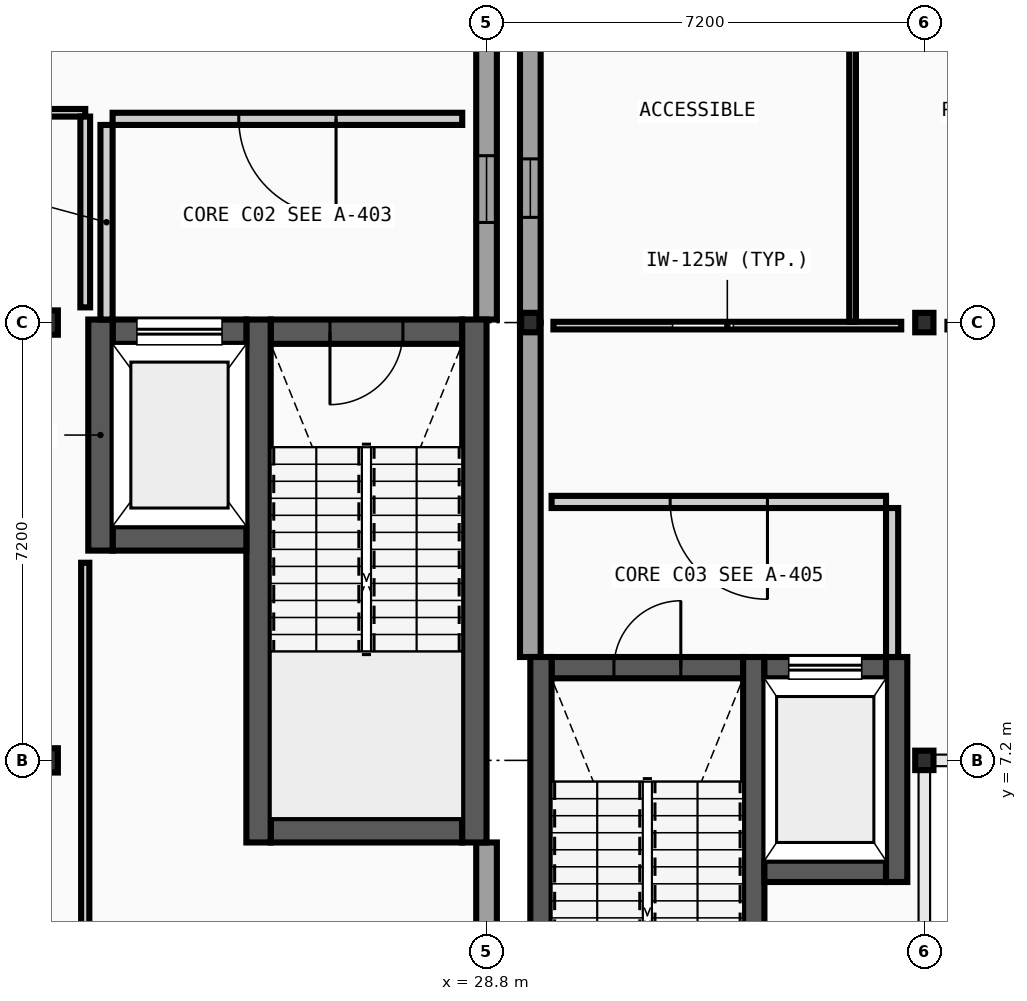
"""IFC4 building model, lengths in metres.
Left out: names, types, materials, properties, quantities, classifications, styles, units other than length and angle.
Written with IfcOpenShell. Run it as: python <this file> out.ifc"""

import sys

from ifc_helpers import new_model, si_unit, direction, frame, frame_2d, origin, origin_2d, place, context, subcontext, project, spatial, rectangle, i_section, extrude, element, fill, save


model = new_model("IFC4")
c1 = context("Model", 3, precision=1e-05, world=origin(), true_north=direction((0.0, 1.0)))
c2 = subcontext(c1, "Body", "Model", "MODEL_VIEW")
j1 = project(units=[si_unit("LENGTHUNIT", "METRE"), si_unit("PLANEANGLEUNIT", "RADIAN")], contexts=[c1])
p1 = place(None, origin())
s1 = spatial("IfcSite", under=j1, at=p1, CompositionType="ELEMENT")
p2 = place(p1, origin())
s2 = spatial("IfcBuilding", under=s1, at=p2, CompositionType="ELEMENT")
p3 = place(p2, frame((0.0, 0.0, 14.0)))
s3 = spatial("IfcBuildingStorey", under=s2, at=p3, CompositionType="ELEMENT", Elevation=14.0)
for number, where, z_axis, x_axis in (
    (1, (21.6, 7.2, 0.0), (0.0, 0.0, 1.0), (1.0, 0.0, 0.0)),
    (2, (21.6, 14.4, 0.0), (0.0, 0.0, 1.0), (1.0, 0.0, 0.0)),
):
    element("IfcColumn", number, at=place(p3, frame(where, z_axis=z_axis, x_axis=x_axis)), inside=s3, PredefinedType="COLUMN", context=c2, shape_type="SweptSolid", body=[
        extrude(i_section(OverallWidth=0.3, OverallDepth=0.4, WebThickness=0.013, FlangeThickness=0.024, FilletRadius=0.027, at=origin_2d()), origin(), (0.0, 0.0, 1.0), 4.4),
    ])
for number, where, z_axis, x_axis in (
    (3, (29.52, 14.4, 0.0), (0.0, 0.0, 1.0), (1.0, 0.0, 0.0)),
    (4, (36.0, 7.2, 0.0), (0.0, 0.0, 1.0), (1.0, 0.0, 0.0)),
    (5, (36.0, 14.4, 0.0), (0.0, 0.0, 1.0), (1.0, 0.0, 0.0)),
):
    element("IfcColumn", number, at=place(p3, frame(where, z_axis=z_axis, x_axis=x_axis)), inside=s3, PredefinedType="COLUMN", context=c2, shape_type="SweptSolid", body=[
        extrude(i_section(OverallWidth=0.3, OverallDepth=0.32, WebThickness=0.011, FlangeThickness=0.021, FilletRadius=0.027, at=origin_2d()), origin(), (0.0, 0.0, 1.0), 4.4),
    ])
p4 = place(p3, frame((28.8, -0.17, 0.0), z_axis=(0.0, 0.0, 1.0), x_axis=(0.0, 1.0, 0.0)))
e6 = element("IfcWall", 6, at=p4, inside=s3, PredefinedType="STANDARD", context=c2, shape_type="SweptSolid", body=[
    extrude(rectangle(XDim=6.02, YDim=0.34, at=frame_2d((3.01, 0.0))), origin(), (0.0, 0.0, 1.0), 4.2),
])
p5 = place(p4, frame((2.478, 0.0, 0.95)))
e7 = element("IfcOpeningElement", 7, at=p5, cuts=e6, PredefinedType="OPENING", context=c2, shape_type="SweptSolid", body=[
    extrude(rectangle(XDim=1.064, YDim=1.368, at=frame_2d((0.532, 0.684))), frame((0.0, 0.18, 0.0), z_axis=(0.0, -1.0, 0.0), x_axis=(1.0, 0.0, 0.0)), (0.0, 0.0, 1.0), 0.36),
])
p6 = place(p3, frame((28.8, 14.45, 0.0), z_axis=(0.0, 0.0, 1.0), x_axis=(0.0, 1.0, 0.0)))
e8 = element("IfcWall", 8, at=p6, inside=s3, PredefinedType="STANDARD", context=c2, shape_type="SweptSolid", body=[
    extrude(rectangle(XDim=7.15, YDim=0.34, at=frame_2d((3.575, 0.0))), origin(), (0.0, 0.0, 1.0), 4.2),
])
p7 = place(p6, frame((1.596, 0.0, 0.95)))
e9 = element("IfcOpeningElement", 9, at=p7, cuts=e8, PredefinedType="OPENING", context=c2, shape_type="SweptSolid", body=[
    extrude(rectangle(XDim=1.098, YDim=1.368, at=frame_2d((0.549, 0.684))), frame((0.0, 0.18, 0.0), z_axis=(0.0, -1.0, 0.0), x_axis=(1.0, 0.0, 0.0)), (0.0, 0.0, 1.0), 0.36),
])
p8 = place(p6, frame((4.456, 0.0, 0.95)))
e10 = element("IfcOpeningElement", 10, at=p8, cuts=e8, PredefinedType="OPENING", context=c2, shape_type="SweptSolid", body=[
    extrude(rectangle(XDim=1.098, YDim=1.368, at=frame_2d((0.549, 0.684))), frame((0.0, 0.18, 0.0), z_axis=(0.0, -1.0, 0.0), x_axis=(1.0, 0.0, 0.0)), (0.0, 0.0, 1.0), 0.36),
])
p9 = place(p3, frame((29.52, 14.4, 0.0), z_axis=(0.0, 0.0, 1.0), x_axis=(0.0, -1.0, 0.0)))
e11 = element("IfcWall", 11, at=p9, inside=s3, PredefinedType="STANDARD", context=c2, shape_type="SweptSolid", body=[
    extrude(rectangle(XDim=5.5, YDim=0.34, at=frame_2d((2.75, 0.0))), origin(), (0.0, 0.0, 1.0), 4.2),
])
p10 = place(p3, frame((29.52, 21.77, 0.0), z_axis=(0.0, 0.0, 1.0), x_axis=(0.0, -1.0, 0.0)))
e12 = element("IfcWall", 12, at=p10, inside=s3, PredefinedType="STANDARD", context=c2, shape_type="SweptSolid", body=[
    extrude(rectangle(XDim=7.37, YDim=0.34, at=frame_2d((3.685, 0.0))), origin(), (0.0, 0.0, 1.0), 3.895),
])
p11 = place(p10, frame((1.73, 0.0, 0.95)))
e13 = element("IfcOpeningElement", 13, at=p11, cuts=e12, PredefinedType="OPENING", context=c2, shape_type="SweptSolid", body=[
    extrude(rectangle(XDim=0.962, YDim=1.404, at=frame_2d((0.481, 0.702))), frame((0.0, 0.18, 0.0), z_axis=(0.0, -1.0, 0.0), x_axis=(1.0, 0.0, 0.0)), (0.0, 0.0, 1.0), 0.36),
])
p12 = place(p10, frame((4.678, 0.0, 0.95)))
e14 = element("IfcOpeningElement", 14, at=p12, cuts=e12, PredefinedType="OPENING", context=c2, shape_type="SweptSolid", body=[
    extrude(rectangle(XDim=0.962, YDim=1.404, at=frame_2d((0.481, 0.702))), frame((0.0, 0.18, 0.0), z_axis=(0.0, -1.0, 0.0), x_axis=(1.0, 0.0, 0.0)), (0.0, 0.0, 1.0), 0.36),
])
p13 = place(p3, frame((25.25, 6.05, 0.0), z_axis=(0.0, 0.0, 1.0), x_axis=(1.0, 0.0, 0.0)))
e15 = element("IfcWall", 15, at=p13, inside=s3, PredefinedType="SHEAR", context=c2, shape_type="SweptSolid", body=[
    extrude(rectangle(XDim=3.15, YDim=0.4, at=frame_2d((1.575, 0.0))), origin(), (0.0, 0.0, 1.0), 4.2),
])
p14 = place(p3, frame((25.25, 14.25, 0.0), z_axis=(0.0, 0.0, 1.0), x_axis=(1.0, 0.0, 0.0)))
e16 = element("IfcWall", 16, at=p14, inside=s3, PredefinedType="SHEAR", context=c2, shape_type="SweptSolid", body=[
    extrude(rectangle(XDim=3.15, YDim=0.4, at=frame_2d((1.575, 0.0))), origin(), (0.0, 0.0, 1.0), 4.2),
])
p15 = place(p14, frame((0.975, 0.0, 0.0)))
e17 = element("IfcOpeningElement", 17, at=p15, cuts=e16, PredefinedType="OPENING", context=c2, shape_type="SweptSolid", body=[
    extrude(rectangle(XDim=1.2, YDim=2.15, at=frame_2d((0.6, 1.075))), frame((0.0, 0.21, 0.0), z_axis=(0.0, -1.0, 0.0), x_axis=(1.0, 0.0, 0.0)), (0.0, 0.0, 1.0), 0.42),
])
for number, where, z_axis, x_axis in (
    (18, (25.05, 5.85, 0.0), (0.0, 0.0, 1.0), (0.0, 1.0, 0.0)),
    (19, (28.6, 5.85, 0.0), (0.0, 0.0, 1.0), (0.0, 1.0, 0.0)),
):
    element("IfcWall", number, at=place(p3, frame(where, z_axis=z_axis, x_axis=x_axis)), inside=s3, PredefinedType="SHEAR", context=c2, shape_type="SweptSolid", body=[
        extrude(rectangle(XDim=8.6, YDim=0.4, at=frame_2d((4.3, 0.0))), origin(), (0.0, 0.0, 1.0), 4.2),
    ])
p16 = place(p3, frame((22.65, 10.85, 0.0), z_axis=(0.0, 0.0, 1.0), x_axis=(1.0, 0.0, 0.0)))
e20 = element("IfcWall", 20, at=p16, inside=s3, PredefinedType="SHEAR", context=c2, shape_type="SweptSolid", body=[
    extrude(rectangle(XDim=2.2, YDim=0.4, at=frame_2d((1.1, 0.0))), origin(), (0.0, 0.0, 1.0), 4.2),
])
p17 = place(p3, frame((22.65, 14.25, 0.0), z_axis=(0.0, 0.0, 1.0), x_axis=(1.0, 0.0, 0.0)))
e21 = element("IfcWall", 21, at=p17, inside=s3, PredefinedType="SHEAR", context=c2, shape_type="SweptSolid", body=[
    extrude(rectangle(XDim=2.2, YDim=0.4, at=frame_2d((1.1, 0.0))), origin(), (0.0, 0.0, 1.0), 4.2),
])
p18 = place(p17, frame((0.4, 0.0, 0.0)))
e22 = element("IfcOpeningElement", 22, at=p18, cuts=e21, PredefinedType="OPENING", context=c2, shape_type="SweptSolid", body=[
    extrude(rectangle(XDim=1.4, YDim=2.2, at=frame_2d((0.7, 1.1))), frame((0.0, 0.21, 0.0), z_axis=(0.0, -1.0, 0.0), x_axis=(1.0, 0.0, 0.0)), (0.0, 0.0, 1.0), 0.42),
])
p19 = place(p3, frame((22.45, 10.65, 0.0), z_axis=(0.0, 0.0, 1.0), x_axis=(0.0, 1.0, 0.0)))
e23 = element("IfcWall", 23, at=p19, inside=s3, PredefinedType="SHEAR", context=c2, shape_type="SweptSolid", body=[
    extrude(rectangle(XDim=3.8, YDim=0.4, at=frame_2d((1.9, 0.0))), origin(), (0.0, 0.0, 1.0), 4.2),
])
p20 = place(p3, frame((22.65, 17.75, 0.0), z_axis=(0.0, 0.0, 1.0), x_axis=(1.0, 0.0, 0.0)))
e24 = element("IfcWall", 24, at=p20, inside=s3, PredefinedType="PARTITIONING", context=c2, shape_type="SweptSolid", body=[
    extrude(rectangle(XDim=5.75, YDim=0.2, at=frame_2d((2.875, 0.0))), origin(), (0.0, 0.0, 1.0), 4.2),
])
p21 = place(p20, frame((2.075, 0.0, 0.0)))
e25 = element("IfcOpeningElement", 25, at=p21, cuts=e24, PredefinedType="OPENING", context=c2, shape_type="SweptSolid", body=[
    extrude(rectangle(XDim=1.6, YDim=2.2, at=frame_2d((0.8, 1.1))), frame((0.0, 0.11, 0.0), z_axis=(0.0, -1.0, 0.0), x_axis=(1.0, 0.0, 0.0)), (0.0, 0.0, 1.0), 0.22),
])
p22 = place(p3, frame((22.55, 14.45, 0.0), z_axis=(0.0, 0.0, 1.0), x_axis=(0.0, 1.0, 0.0)))
e26 = element("IfcWall", 26, at=p22, inside=s3, PredefinedType="PARTITIONING", context=c2, shape_type="SweptSolid", body=[
    extrude(rectangle(XDim=3.2, YDim=0.2, at=frame_2d((1.6, 0.0))), origin(), (0.0, 0.0, 1.0), 4.2),
])
p23 = place(p3, frame((29.87, 8.725, 0.0), z_axis=(0.0, 0.0, 1.0), x_axis=(1.0, 0.0, 0.0)))
e27 = element("IfcWall", 27, at=p23, inside=s3, PredefinedType="SHEAR", context=c2, shape_type="SweptSolid", body=[
    extrude(rectangle(XDim=3.15, YDim=0.35, at=frame_2d((1.575, 0.0))), origin(), (0.0, 0.0, 1.0), 4.2),
])
p24 = place(p23, frame((1.025, 0.0, 0.0)))
e28 = element("IfcOpeningElement", 28, at=p24, cuts=e27, PredefinedType="OPENING", context=c2, shape_type="SweptSolid", body=[
    extrude(rectangle(XDim=1.1, YDim=2.15, at=frame_2d((0.55, 1.075))), frame((0.0, 0.185, 0.0), z_axis=(0.0, -1.0, 0.0), x_axis=(1.0, 0.0, 0.0)), (0.0, 0.0, 1.0), 0.37),
])
for number, where, z_axis, x_axis in (
    (29, (29.695, 0.4, 0.0), (0.0, 0.0, 1.0), (0.0, 1.0, 0.0)),
    (30, (33.195, 0.4, 0.0), (0.0, 0.0, 1.0), (0.0, 1.0, 0.0)),
):
    element("IfcWall", number, at=place(p3, frame(where, z_axis=z_axis, x_axis=x_axis)), inside=s3, PredefinedType="SHEAR", context=c2, shape_type="SweptSolid", body=[
        extrude(rectangle(XDim=8.5, YDim=0.35, at=frame_2d((4.25, 0.0))), origin(), (0.0, 0.0, 1.0), 4.2),
    ])
p25 = place(p3, frame((33.37, 5.375, 0.0), z_axis=(0.0, 0.0, 1.0), x_axis=(1.0, 0.0, 0.0)))
e31 = element("IfcWall", 31, at=p25, inside=s3, PredefinedType="SHEAR", context=c2, shape_type="SweptSolid", body=[
    extrude(rectangle(XDim=2.0, YDim=0.35, at=frame_2d((1.0, 0.0))), origin(), (0.0, 0.0, 1.0), 4.2),
])
p26 = place(p3, frame((33.37, 8.725, 0.0), z_axis=(0.0, 0.0, 1.0), x_axis=(1.0, 0.0, 0.0)))
e32 = element("IfcWall", 32, at=p26, inside=s3, PredefinedType="SHEAR", context=c2, shape_type="SweptSolid", body=[
    extrude(rectangle(XDim=2.0, YDim=0.35, at=frame_2d((1.0, 0.0))), origin(), (0.0, 0.0, 1.0), 4.2),
])
p27 = place(p26, frame((0.4, 0.0, 0.0)))
e33 = element("IfcOpeningElement", 33, at=p27, cuts=e32, PredefinedType="OPENING", context=c2, shape_type="SweptSolid", body=[
    extrude(rectangle(XDim=1.2, YDim=2.2, at=frame_2d((0.6, 1.1))), frame((0.0, 0.185, 0.0), z_axis=(0.0, -1.0, 0.0), x_axis=(1.0, 0.0, 0.0)), (0.0, 0.0, 1.0), 0.37),
])
p28 = place(p3, frame((35.545, 5.2, 0.0), z_axis=(0.0, 0.0, 1.0), x_axis=(0.0, 1.0, 0.0)))
e34 = element("IfcWall", 34, at=p28, inside=s3, PredefinedType="SHEAR", context=c2, shape_type="SweptSolid", body=[
    extrude(rectangle(XDim=3.7, YDim=0.35, at=frame_2d((1.85, 0.0))), origin(), (0.0, 0.0, 1.0), 4.2),
])
p29 = place(p3, frame((29.87, 11.45, 0.0), z_axis=(0.0, 0.0, 1.0), x_axis=(1.0, 0.0, 0.0)))
e35 = element("IfcWall", 35, at=p29, inside=s3, PredefinedType="PARTITIONING", context=c2, shape_type="SweptSolid", body=[
    extrude(rectangle(XDim=5.5, YDim=0.2, at=frame_2d((2.75, 0.0))), origin(), (0.0, 0.0, 1.0), 4.2),
])
p30 = place(p29, frame((1.95, 0.0, 0.0)))
e36 = element("IfcOpeningElement", 36, at=p30, cuts=e35, PredefinedType="OPENING", context=c2, shape_type="SweptSolid", body=[
    extrude(rectangle(XDim=1.6, YDim=2.2, at=frame_2d((0.8, 1.1))), frame((0.0, 0.11, 0.0), z_axis=(0.0, -1.0, 0.0), x_axis=(1.0, 0.0, 0.0)), (0.0, 0.0, 1.0), 0.22),
])
p31 = place(p3, frame((35.47, 8.9, 0.0), z_axis=(0.0, 0.0, 1.0), x_axis=(0.0, 1.0, 0.0)))
e37 = element("IfcWall", 37, at=p31, inside=s3, PredefinedType="PARTITIONING", context=c2, shape_type="SweptSolid", body=[
    extrude(rectangle(XDim=2.45, YDim=0.2, at=frame_2d((1.225, 0.0))), origin(), (0.0, 0.0, 1.0), 4.2),
])
p32 = place(p3, frame((29.9, 14.35, 0.0), z_axis=(0.0, 0.0, 1.0), x_axis=(1.0, 0.0, 0.0)))
e38 = element("IfcWall", 38, at=p32, inside=s3, PredefinedType="PARTITIONING", context=c2, shape_type="SweptSolid", body=[
    extrude(rectangle(XDim=5.72, YDim=0.125, at=frame_2d((2.86, 0.0))), origin(), (0.0, 0.0, 1.0), 3.935),
])
p33 = place(p32, frame((1.96, 0.0, 0.0)))
e39 = element("IfcOpeningElement", 39, at=p33, cuts=e38, PredefinedType="OPENING", context=c2, shape_type="SweptSolid", body=[
    extrude(rectangle(XDim=1.0, YDim=2.1, at=frame_2d((0.5, 1.05))), frame((0.0, 0.073, 0.0), z_axis=(0.0, -1.0, 0.0), x_axis=(1.0, 0.0, 0.0)), (0.0, 0.0, 1.0), 0.145),
])
p34 = place(p3, frame((9.45, 17.85, 0.0), z_axis=(0.0, 0.0, 1.0), x_axis=(1.0, 0.0, 0.0)))
e40 = element("IfcWall", 40, at=p34, inside=s3, PredefinedType="PARTITIONING", context=c2, shape_type="SweptSolid", body=[
    extrude(rectangle(XDim=12.75, YDim=0.125, at=frame_2d((6.375, 0.0))), origin(), (0.0, 0.0, 1.0), 4.2),
])
p35 = place(p34, frame((1.225, 0.0, 0.0)))
e41 = element("IfcOpeningElement", 41, at=p35, cuts=e40, PredefinedType="OPENING", context=c2, shape_type="SweptSolid", body=[
    extrude(rectangle(XDim=1.0, YDim=2.1, at=frame_2d((0.5, 1.05))), frame((0.0, 0.073, 0.0), z_axis=(0.0, -1.0, 0.0), x_axis=(1.0, 0.0, 0.0)), (0.0, 0.0, 1.0), 0.145),
])
p36 = place(p34, frame((6.25, 0.0, 0.0)))
e42 = element("IfcOpeningElement", 42, at=p36, cuts=e40, PredefinedType="OPENING", context=c2, shape_type="SweptSolid", body=[
    extrude(rectangle(XDim=0.9, YDim=2.1, at=frame_2d((0.45, 1.05))), frame((0.0, 0.073, 0.0), z_axis=(0.0, -1.0, 0.0), x_axis=(1.0, 0.0, 0.0)), (0.0, 0.0, 1.0), 0.145),
])
p37 = place(p34, frame((8.05, 0.0, 0.0)))
e43 = element("IfcOpeningElement", 43, at=p37, cuts=e40, PredefinedType="OPENING", context=c2, shape_type="SweptSolid", body=[
    extrude(rectangle(XDim=0.906, YDim=2.04, at=frame_2d((0.453, 1.02))), frame((0.0, 0.073, 0.0), z_axis=(0.0, -1.0, 0.0), x_axis=(1.0, 0.0, 0.0)), (0.0, 0.0, 1.0), 0.145),
])
p38 = place(p3, frame((22.2, 0.2, 0.0), z_axis=(0.0, 0.0, 1.0), x_axis=(0.0, 1.0, 0.0)))
e44 = element("IfcWall", 44, at=p38, inside=s3, PredefinedType="PARTITIONING", context=c2, shape_type="SweptSolid", body=[
    extrude(rectangle(XDim=10.25, YDim=0.135, at=frame_2d((5.125, 0.0))), origin(), (0.0, 0.0, 1.0), 4.2),
])
p39 = place(p3, frame((22.2, 14.65, 0.0), z_axis=(0.0, 0.0, 1.0), x_axis=(0.0, 1.0, 0.0)))
e45 = element("IfcWall", 45, at=p39, inside=s3, PredefinedType="PARTITIONING", context=c2, shape_type="SweptSolid", body=[
    extrude(rectangle(XDim=3.138, YDim=0.16, at=frame_2d((1.569, 0.0))), origin(), (0.0, 0.0, 1.0), 4.2),
])
p40 = place(p3, frame((34.82, 14.413, 0.0), z_axis=(0.0, 0.0, 1.0), x_axis=(0.0, 1.0, 0.0)))
e46 = element("IfcWall", 46, at=p40, inside=s3, PredefinedType="PARTITIONING", context=c2, shape_type="SweptSolid", body=[
    extrude(rectangle(XDim=6.987, YDim=0.11, at=frame_2d((3.494, 0.0))), origin(), (0.0, 0.0, 1.0), 4.2),
])
p41 = place(p7, origin())
e47 = element("IfcWindow", 47, at=p41, inside=s3, PartitioningType="SINGLE_PANEL", PredefinedType="WINDOW", context=c2, shape_type="SweptSolid", body=[
    extrude(rectangle(XDim=1.098, YDim=1.368, at=frame_2d((0.549, 0.684))), frame((0.0, 0.03, 0.0), z_axis=(0.0, -1.0, 0.0), x_axis=(1.0, 0.0, 0.0)), (0.0, 0.0, 1.0), 0.06),
])
fill(e9, e47)
p42 = place(p12, origin())
e48 = element("IfcWindow", 48, at=p42, inside=s3, PartitioningType="SINGLE_PANEL", PredefinedType="WINDOW", context=c2, shape_type="SweptSolid", body=[
    extrude(rectangle(XDim=0.962, YDim=1.404, at=frame_2d((0.481, 0.702))), frame((0.0, 0.03, 0.0), z_axis=(0.0, -1.0, 0.0), x_axis=(1.0, 0.0, 0.0)), (0.0, 0.0, 1.0), 0.06),
])
fill(e14, e48)
p43 = place(p15, frame((1.2, 0.0, 0.0), z_axis=(0.0, 0.0, 1.0), x_axis=(-1.0, 0.0, 0.0)))
e49 = element("IfcDoor", 49, at=p43, inside=s3, OperationType="SINGLE_SWING_LEFT", PredefinedType="DOOR", context=c2, shape_type="SweptSolid", body=[
    extrude(rectangle(XDim=1.2, YDim=2.15, at=frame_2d((0.6, 1.075))), frame((0.0, 0.025, 0.0), z_axis=(0.0, -1.0, 0.0), x_axis=(1.0, 0.0, 0.0)), (0.0, 0.0, 1.0), 0.05),
])
fill(e17, e49)
p44 = place(p18, origin())
e50 = element("IfcDoor", 50, at=p44, inside=s3, OperationType="SLIDING_TO_LEFT", PredefinedType="DOOR", context=c2, shape_type="SweptSolid", body=[
    extrude(rectangle(XDim=1.4, YDim=2.2, at=frame_2d((0.7, 1.1))), frame((0.0, 0.025, 0.0), z_axis=(0.0, -1.0, 0.0), x_axis=(1.0, 0.0, 0.0)), (0.0, 0.0, 1.0), 0.05),
])
fill(e22, e50)
p45 = place(p21, origin())
e51 = element("IfcDoor", 51, at=p45, inside=s3, OperationType="DOUBLE_DOOR_SINGLE_SWING", PredefinedType="DOOR", context=c2, shape_type="SweptSolid", body=[
    extrude(rectangle(XDim=1.6, YDim=2.2, at=frame_2d((0.8, 1.1))), frame((0.0, 0.025, 0.0), z_axis=(0.0, -1.0, 0.0), x_axis=(1.0, 0.0, 0.0)), (0.0, 0.0, 1.0), 0.05),
])
fill(e25, e51)
p46 = place(p24, frame((1.1, 0.0, 0.0), z_axis=(0.0, 0.0, 1.0), x_axis=(-1.0, 0.0, 0.0)))
e52 = element("IfcDoor", 52, at=p46, inside=s3, OperationType="SINGLE_SWING_RIGHT", PredefinedType="DOOR", context=c2, shape_type="SweptSolid", body=[
    extrude(rectangle(XDim=1.1, YDim=2.15, at=frame_2d((0.55, 1.075))), frame((0.0, 0.025, 0.0), z_axis=(0.0, -1.0, 0.0), x_axis=(1.0, 0.0, 0.0)), (0.0, 0.0, 1.0), 0.05),
])
fill(e28, e52)
p47 = place(p27, origin())
e53 = element("IfcDoor", 53, at=p47, inside=s3, OperationType="SLIDING_TO_RIGHT", PredefinedType="DOOR", context=c2, shape_type="SweptSolid", body=[
    extrude(rectangle(XDim=1.2, YDim=2.2, at=frame_2d((0.6, 1.1))), frame((0.0, 0.025, 0.0), z_axis=(0.0, -1.0, 0.0), x_axis=(1.0, 0.0, 0.0)), (0.0, 0.0, 1.0), 0.05),
])
fill(e33, e53)
p48 = place(p30, origin())
e54 = element("IfcDoor", 54, at=p48, inside=s3, OperationType="DOUBLE_DOOR_SINGLE_SWING", PredefinedType="DOOR", context=c2, shape_type="SweptSolid", body=[
    extrude(rectangle(XDim=1.6, YDim=2.2, at=frame_2d((0.8, 1.1))), frame((0.0, 0.025, 0.0), z_axis=(0.0, -1.0, 0.0), x_axis=(1.0, 0.0, 0.0)), (0.0, 0.0, 1.0), 0.05),
])
fill(e36, e54)
p49 = place(p33, frame((1.0, 0.0, 0.0), z_axis=(0.0, 0.0, 1.0), x_axis=(-1.0, 0.0, 0.0)))
e55 = element("IfcDoor", 55, at=p49, inside=s3, OperationType="SLIDING_TO_LEFT", PredefinedType="DOOR", context=c2, shape_type="SweptSolid", body=[
    extrude(rectangle(XDim=1.0, YDim=2.1, at=frame_2d((0.5, 1.05))), frame((0.0, 0.025, 0.0), z_axis=(0.0, -1.0, 0.0), x_axis=(1.0, 0.0, 0.0)), (0.0, 0.0, 1.0), 0.05),
])
fill(e39, e55)
save(model, sys.argv[1])
